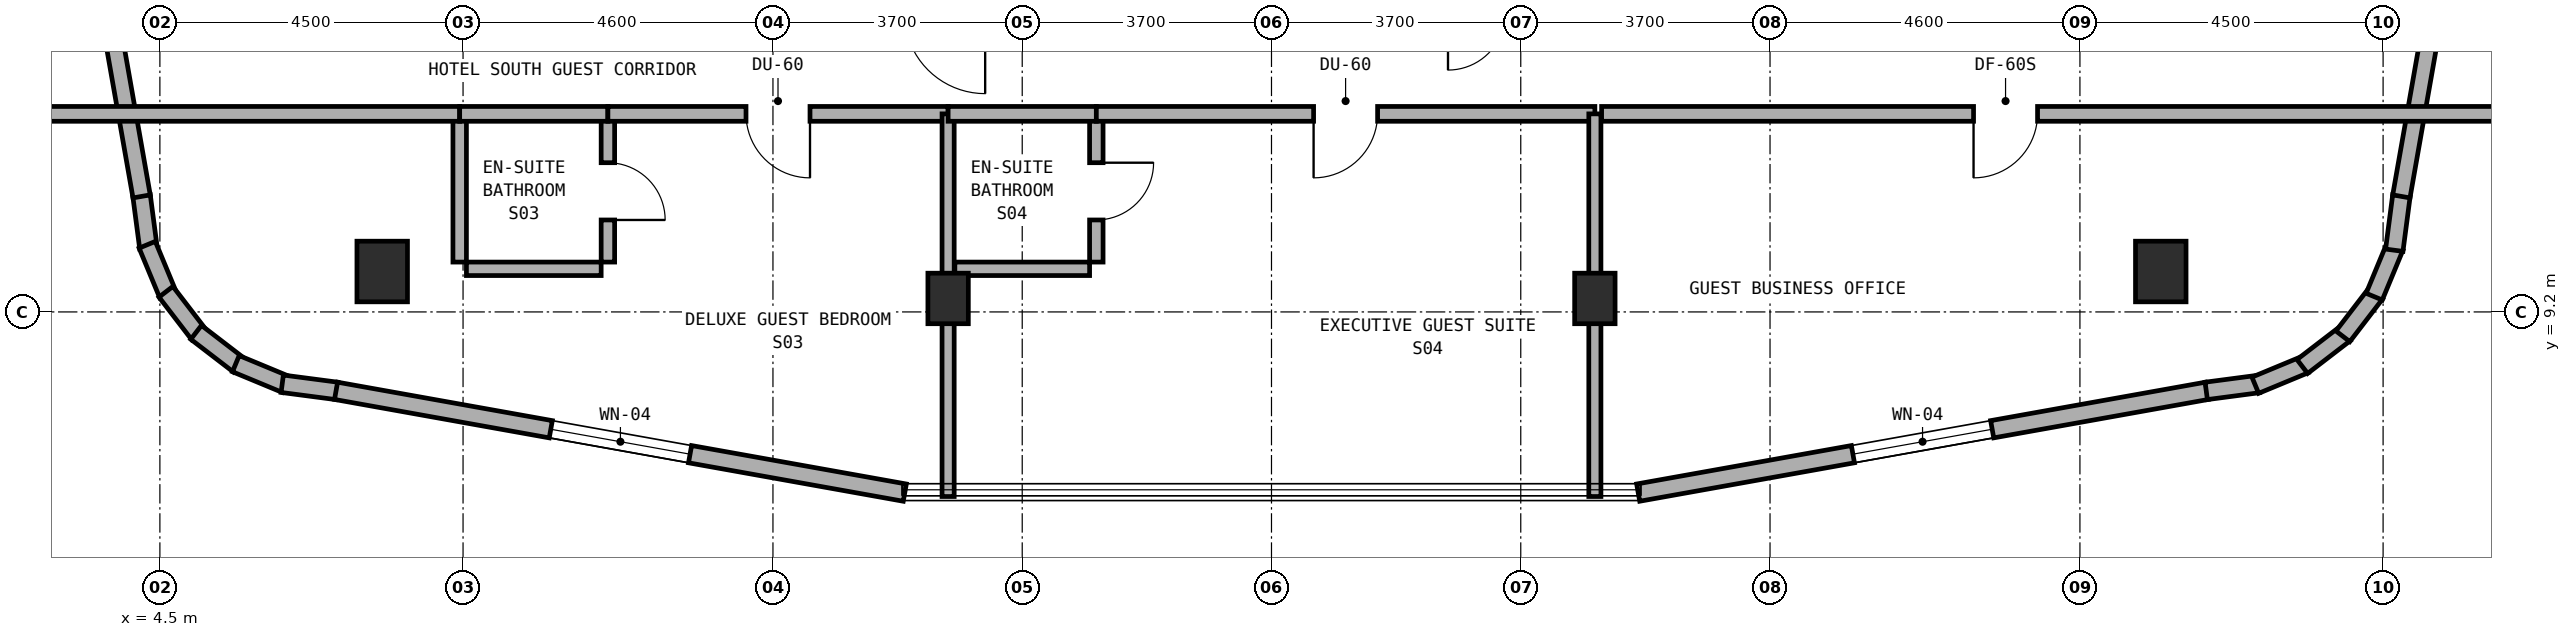
"""IFC4 building model, lengths in metres.
Left out: names, types, materials, properties, quantities, classifications, styles, units other than length and angle.
Written with IfcOpenShell. Run it as: python <this file> out.ifc"""

import sys

from ifc_helpers import new_model, si_unit, direction, frame, frame_2d, origin, origin_2d, place, context, subcontext, project, spatial, rectangle, extrude, element, fill, save


model = new_model("IFC4")
c1 = context("Model", 3, precision=1e-05, world=origin(), true_north=direction((0.0, 1.0)))
c2 = subcontext(c1, "Body", "Model", "MODEL_VIEW")
j1 = project(units=[si_unit("LENGTHUNIT", "METRE"), si_unit("PLANEANGLEUNIT", "RADIAN")], contexts=[c1])
p1 = place(None, origin())
s1 = spatial("IfcSite", under=j1, at=p1, CompositionType="ELEMENT")
p2 = place(p1, origin())
s2 = spatial("IfcBuilding", under=s1, at=p2, CompositionType="ELEMENT")
p3 = place(p2, frame((0.0, 0.0, 246.8)))
s3 = spatial("IfcBuildingStorey", under=s2, at=p3, CompositionType="ELEMENT", Elevation=246.8)
for number, where, z_axis, x_axis in (
    (1, (16.2, 9.4, 0.0), (0.0, 0.0, 1.0), (1.0, 0.0, 0.0)),
    (2, (25.8, 9.4, 0.0), (0.0, 0.0, 1.0), (1.0, 0.0, 0.0)),
):
    element("IfcColumn", number, at=place(p3, frame(where, z_axis=z_axis, x_axis=x_axis)), inside=s3, PredefinedType="COLUMN", context=c2, shape_type="SweptSolid", body=[
        extrude(rectangle(XDim=0.6, YDim=0.75, at=origin_2d()), origin(), (0.0, 0.0, 1.0), 3.6),
    ])
for number, where, z_axis, x_axis in (
    (3, (7.8, 9.8, 0.0), (0.0, 0.0, 1.0), (1.0, 0.0, 0.0)),
    (4, (34.2, 9.8, 0.0), (0.0, 0.0, 1.0), (1.0, 0.0, 0.0)),
):
    element("IfcColumn", number, at=place(p3, frame(where, z_axis=z_axis, x_axis=x_axis)), inside=s3, PredefinedType="COLUMN", context=c2, shape_type="SweptSolid", body=[
        extrude(rectangle(XDim=0.75, YDim=0.9, at=origin_2d()), origin(), (0.0, 0.0, 1.0), 3.6),
    ])
p4 = place(p3, frame((4.228, 10.925, 0.0), z_axis=(0.0, 0.0, 1.0), x_axis=(0.130689052056, -0.991423406861, 0.0)))
e5 = element("IfcWall", 5, at=p4, inside=s3, PredefinedType="STANDARD", context=c2, shape_type="SweptSolid", body=[
    extrude(rectangle(XDim=0.781, YDim=0.26, at=frame_2d((0.39, 0.0))), origin(), (0.0, 0.0, 1.0), 3.32),
])
p5 = place(p3, frame((4.312, 10.197, 0.0), z_axis=(0.0, 0.0, 1.0), x_axis=(0.382900540965, -0.923789573295, 0.0)))
e6 = element("IfcWall", 6, at=p5, inside=s3, PredefinedType="STANDARD", context=c2, shape_type="SweptSolid", body=[
    extrude(rectangle(XDim=0.799, YDim=0.26, at=frame_2d((0.399, 0.0))), origin(), (0.0, 0.0, 1.0), 3.32),
])
p6 = place(p3, frame((4.59, 9.499, 0.0), z_axis=(0.0, 0.0, 1.0), x_axis=(0.608823262828, -0.793305889705, 0.0)))
e7 = element("IfcWall", 7, at=p6, inside=s3, PredefinedType="STANDARD", context=c2, shape_type="SweptSolid", body=[
    extrude(rectangle(XDim=0.798, YDim=0.26, at=frame_2d((0.399, 0.0))), origin(), (0.0, 0.0, 1.0), 3.32),
])
p7 = place(p3, frame((5.038, 8.897, 0.0), z_axis=(0.0, 0.0, 1.0), x_axis=(0.793044635519, -0.60916352983, 0.0)))
e8 = element("IfcWall", 8, at=p7, inside=s3, PredefinedType="STANDARD", context=c2, shape_type="SweptSolid", body=[
    extrude(rectangle(XDim=0.798, YDim=0.26, at=frame_2d((0.399, 0.0))), origin(), (0.0, 0.0, 1.0), 3.32),
])
p8 = place(p3, frame((5.627, 8.432, 0.0), z_axis=(0.0, 0.0, 1.0), x_axis=(0.923789573295, -0.382900540965, 0.0)))
e9 = element("IfcWall", 9, at=p8, inside=s3, PredefinedType="STANDARD", context=c2, shape_type="SweptSolid", body=[
    extrude(rectangle(XDim=0.799, YDim=0.26, at=frame_2d((0.399, 0.0))), origin(), (0.0, 0.0, 1.0), 3.32),
])
p9 = place(p3, frame((6.316, 8.134, 0.0), z_axis=(0.0, 0.0, 1.0), x_axis=(0.99153354416, -0.129850802102, 0.0)))
e10 = element("IfcWall", 10, at=p9, inside=s3, PredefinedType="STANDARD", context=c2, shape_type="SweptSolid", body=[
    extrude(rectangle(XDim=0.816, YDim=0.26, at=frame_2d((0.408, 0.0))), origin(), (0.0, 0.0, 1.0), 3.32),
])
p10 = place(p3, frame((7.115, 8.029, 0.0), z_axis=(0.0, 0.0, 1.0), x_axis=(0.98435676639, -0.176186709098, 0.0)))
e11 = element("IfcWall", 11, at=p10, inside=s3, PredefinedType="STANDARD", context=c2, shape_type="SweptSolid", body=[
    extrude(rectangle(XDim=8.576, YDim=0.26, at=frame_2d((4.288, 0.0))), origin(), (0.0, 0.0, 1.0), 3.32),
])
p11 = place(p10, frame((3.238, 0.0, 0.85)))
e12 = element("IfcOpeningElement", 12, at=p11, cuts=e11, PredefinedType="OPENING", context=c2, shape_type="SweptSolid", body=[
    extrude(rectangle(XDim=2.1, YDim=1.5, at=frame_2d((1.05, 0.75))), frame((0.0, 0.14, 0.0), z_axis=(0.0, -1.0, 0.0), x_axis=(1.0, 0.0, 0.0)), (0.0, 0.0, 1.0), 0.28),
])
p12 = place(p3, frame((26.443, 6.518, 0.0), z_axis=(0.0, 0.0, 1.0), x_axis=(0.98435676639, 0.176186709098, 0.0)))
e13 = element("IfcWall", 13, at=p12, inside=s3, PredefinedType="STANDARD", context=c2, shape_type="SweptSolid", body=[
    extrude(rectangle(XDim=8.576, YDim=0.26, at=frame_2d((4.288, 0.0))), origin(), (0.0, 0.0, 1.0), 3.32),
])
p13 = place(p12, frame((3.238, 0.0, 0.85)))
e14 = element("IfcOpeningElement", 14, at=p13, cuts=e13, PredefinedType="OPENING", context=c2, shape_type="SweptSolid", body=[
    extrude(rectangle(XDim=2.1, YDim=1.5, at=frame_2d((1.05, 0.75))), frame((0.0, 0.14, 0.0), z_axis=(0.0, -1.0, 0.0), x_axis=(1.0, 0.0, 0.0)), (0.0, 0.0, 1.0), 0.28),
])
p14 = place(p3, frame((34.875, 8.028, 0.0), z_axis=(0.0, 0.0, 1.0), x_axis=(0.991458553189, 0.130422150372, 0.0)))
e15 = element("IfcWall", 15, at=p14, inside=s3, PredefinedType="STANDARD", context=c2, shape_type="SweptSolid", body=[
    extrude(rectangle(XDim=0.781, YDim=0.26, at=frame_2d((0.39, 0.0))), origin(), (0.0, 0.0, 1.0), 3.32),
])
p15 = place(p3, frame((35.603, 8.112, 0.0), z_axis=(0.0, 0.0, 1.0), x_axis=(0.923789573295, 0.382900540965, 0.0)))
e16 = element("IfcWall", 16, at=p15, inside=s3, PredefinedType="STANDARD", context=c2, shape_type="SweptSolid", body=[
    extrude(rectangle(XDim=0.799, YDim=0.26, at=frame_2d((0.399, 0.0))), origin(), (0.0, 0.0, 1.0), 3.32),
])
for number, where, z_axis, x_axis in (
    (17, (36.301, 8.39, 0.0), (0.0, 0.0, 1.0), (0.793, 0.609, 0.0)),
    (18, (36.903, 8.838, 0.0), (0.0, 0.0, 1.0), (0.609, 0.793, 0.0)),
):
    element("IfcWall", number, at=place(p3, frame(where, z_axis=z_axis, x_axis=x_axis)), inside=s3, PredefinedType="STANDARD", context=c2, shape_type="SweptSolid", body=[
        extrude(rectangle(XDim=0.798, YDim=0.26, at=frame_2d((0.399, 0.0))), origin(), (0.0, 0.0, 1.0), 3.32),
    ])
p16 = place(p3, frame((37.368, 9.427, 0.0), z_axis=(0.0, 0.0, 1.0), x_axis=(0.383161279238, 0.923681457047, 0.0)))
e19 = element("IfcWall", 19, at=p16, inside=s3, PredefinedType="STANDARD", context=c2, shape_type="SweptSolid", body=[
    extrude(rectangle(XDim=0.799, YDim=0.26, at=frame_2d((0.399, 0.0))), origin(), (0.0, 0.0, 1.0), 3.32),
])
p17 = place(p3, frame((37.666, 10.116, 0.0), z_axis=(0.0, 0.0, 1.0), x_axis=(0.129850802102, 0.99153354416, 0.0)))
e20 = element("IfcWall", 20, at=p17, inside=s3, PredefinedType="STANDARD", context=c2, shape_type="SweptSolid", body=[
    extrude(rectangle(XDim=0.816, YDim=0.26, at=frame_2d((0.408, 0.0))), origin(), (0.0, 0.0, 1.0), 3.32),
])
p18 = place(p3, frame((37.771, 10.915, 0.0), z_axis=(0.0, 0.0, 1.0), x_axis=(0.173396937698, 0.984852020355, 0.0)))
e21 = element("IfcWall", 21, at=p18, inside=s3, PredefinedType="STANDARD", context=c2, shape_type="SweptSolid", body=[
    extrude(rectangle(XDim=8.714, YDim=0.26, at=frame_2d((4.357, 0.0))), origin(), (0.0, 0.0, 1.0), 3.32),
])
p19 = place(p18, frame((4.647, 0.0, 0.85)))
e22 = element("IfcOpeningElement", 22, at=p19, cuts=e21, PredefinedType="OPENING", context=c2, shape_type="SweptSolid", body=[
    extrude(rectangle(XDim=2.1, YDim=1.5, at=frame_2d((1.05, 0.75))), frame((0.0, 0.14, 0.0), z_axis=(0.0, -1.0, 0.0), x_axis=(1.0, 0.0, 0.0)), (0.0, 0.0, 1.0), 0.28),
])
p20 = place(p3, frame((2.718, 19.497, 0.0), z_axis=(0.0, 0.0, 1.0), x_axis=(0.173396937698, -0.984852020355, 0.0)))
e23 = element("IfcWall", 23, at=p20, inside=s3, PredefinedType="STANDARD", context=c2, shape_type="SweptSolid", body=[
    extrude(rectangle(XDim=8.714, YDim=0.26, at=frame_2d((4.357, 0.0))), origin(), (0.0, 0.0, 1.0), 3.32),
])
p21 = place(p20, frame((2.627, 0.0, 0.85)))
e24 = element("IfcOpeningElement", 24, at=p21, cuts=e23, PredefinedType="OPENING", context=c2, shape_type="SweptSolid", body=[
    extrude(rectangle(XDim=2.1, YDim=1.5, at=frame_2d((1.05, 0.75))), frame((0.0, 0.14, 0.0), z_axis=(0.0, -1.0, 0.0), x_axis=(1.0, 0.0, 0.0)), (0.0, 0.0, 1.0), 0.28),
])
p22 = place(p3, frame((11.15, 9.94, 0.0), z_axis=(0.0, 0.0, 1.0), x_axis=(0.0, 1.0, 0.0)))
e25 = element("IfcWall", 25, at=p22, inside=s3, PredefinedType="PLUMBINGWALL", context=c2, shape_type="SweptSolid", body=[
    extrude(rectangle(XDim=2.1, YDim=0.2, at=frame_2d((1.05, 0.0))), origin(), (0.0, 0.0, 1.0), 3.025),
])
p23 = place(p22, frame((0.625, 0.0, 0.0)))
e26 = element("IfcOpeningElement", 26, at=p23, cuts=e25, PredefinedType="OPENING", context=c2, shape_type="SweptSolid", body=[
    extrude(rectangle(XDim=0.85, YDim=2.1, at=frame_2d((0.425, 1.05))), frame((0.0, 0.11, 0.0), z_axis=(0.0, -1.0, 0.0), x_axis=(1.0, 0.0, 0.0)), (0.0, 0.0, 1.0), 0.22),
])
p24 = place(p3, frame((9.05, 9.84, 0.0), z_axis=(0.0, 0.0, 1.0), x_axis=(1.0, 0.0, 0.0)))
e27 = element("IfcWall", 27, at=p24, inside=s3, PredefinedType="PLUMBINGWALL", context=c2, shape_type="SweptSolid", body=[
    extrude(rectangle(XDim=2.0, YDim=0.2, at=frame_2d((1.0, 0.0))), origin(), (0.0, 0.0, 1.0), 3.015),
])
p25 = place(p3, frame((8.95, 9.94, 0.0), z_axis=(0.0, 0.0, 1.0), x_axis=(0.0, 1.0, 0.0)))
e28 = element("IfcWall", 28, at=p25, inside=s3, PredefinedType="PLUMBINGWALL", context=c2, shape_type="SweptSolid", body=[
    extrude(rectangle(XDim=2.1, YDim=0.2, at=frame_2d((1.05, 0.0))), origin(), (0.0, 0.0, 1.0), 3.025),
])
p26 = place(p3, frame((2.76, 12.14, 0.0), z_axis=(0.0, 0.0, 1.0), x_axis=(1.0, 0.0, 0.0)))
e29 = element("IfcWall", 29, at=p26, inside=s3, PredefinedType="SOLIDWALL", context=c2, shape_type="SweptSolid", body=[
    extrude(rectangle(XDim=6.19, YDim=0.22, at=frame_2d((3.095, 0.0))), origin(), (0.0, 0.0, 1.0), 2.745),
])
p27 = place(p3, frame((8.95, 12.14, 0.0), z_axis=(0.0, 0.0, 1.0), x_axis=(1.0, 0.0, 0.0)))
e30 = element("IfcWall", 30, at=p27, inside=s3, PredefinedType="SOLIDWALL", context=c2, shape_type="SweptSolid", body=[
    extrude(rectangle(XDim=2.2, YDim=0.22, at=frame_2d((1.1, 0.0))), origin(), (0.0, 0.0, 1.0), 3.32),
])
p28 = place(p3, frame((11.15, 12.14, 0.0), z_axis=(0.0, 0.0, 1.0), x_axis=(1.0, 0.0, 0.0)))
e31 = element("IfcWall", 31, at=p28, inside=s3, PredefinedType="SOLIDWALL", context=c2, shape_type="SweptSolid", body=[
    extrude(rectangle(XDim=5.05, YDim=0.22, at=frame_2d((2.525, 0.0))), origin(), (0.0, 0.0, 1.0), 2.745),
])
p29 = place(p28, frame((2.05, 0.0, 0.0)))
e32 = element("IfcOpeningElement", 32, at=p29, cuts=e31, PredefinedType="OPENING", context=c2, shape_type="SweptSolid", body=[
    extrude(rectangle(XDim=0.95, YDim=2.1, at=frame_2d((0.475, 1.05))), frame((0.0, 0.12, 0.0), z_axis=(0.0, -1.0, 0.0), x_axis=(1.0, 0.0, 0.0)), (0.0, 0.0, 1.0), 0.24),
])
p30 = place(p3, frame((16.2, 6.46, 0.0), z_axis=(0.0, 0.0, 1.0), x_axis=(0.0, 1.0, 0.0)))
e33 = element("IfcWall", 33, at=p30, inside=s3, PredefinedType="SOLIDWALL", context=c2, shape_type="SweptSolid", body=[
    extrude(rectangle(XDim=5.68, YDim=0.18, at=frame_2d((2.84, 0.0))), origin(), (0.0, 0.0, 1.0), 2.745),
])
p31 = place(p3, frame((18.4, 9.94, 0.0), z_axis=(0.0, 0.0, 1.0), x_axis=(0.0, 1.0, 0.0)))
e34 = element("IfcWall", 34, at=p31, inside=s3, PredefinedType="PLUMBINGWALL", context=c2, shape_type="SweptSolid", body=[
    extrude(rectangle(XDim=2.1, YDim=0.2, at=frame_2d((1.05, 0.0))), origin(), (0.0, 0.0, 1.0), 3.025),
])
p32 = place(p31, frame((0.625, 0.0, 0.0)))
e35 = element("IfcOpeningElement", 35, at=p32, cuts=e34, PredefinedType="OPENING", context=c2, shape_type="SweptSolid", body=[
    extrude(rectangle(XDim=0.85, YDim=2.1, at=frame_2d((0.425, 1.05))), frame((0.0, 0.11, 0.0), z_axis=(0.0, -1.0, 0.0), x_axis=(1.0, 0.0, 0.0)), (0.0, 0.0, 1.0), 0.22),
])
p33 = place(p3, frame((16.3, 9.84, 0.0), z_axis=(0.0, 0.0, 1.0), x_axis=(1.0, 0.0, 0.0)))
e36 = element("IfcWall", 36, at=p33, inside=s3, PredefinedType="PLUMBINGWALL", context=c2, shape_type="SweptSolid", body=[
    extrude(rectangle(XDim=2.0, YDim=0.2, at=frame_2d((1.0, 0.0))), origin(), (0.0, 0.0, 1.0), 3.32),
])
p34 = place(p3, frame((16.2, 12.14, 0.0), z_axis=(0.0, 0.0, 1.0), x_axis=(1.0, 0.0, 0.0)))
e37 = element("IfcWall", 37, at=p34, inside=s3, PredefinedType="SOLIDWALL", context=c2, shape_type="SweptSolid", body=[
    extrude(rectangle(XDim=2.2, YDim=0.22, at=frame_2d((1.1, 0.0))), origin(), (0.0, 0.0, 1.0), 2.745),
])
p35 = place(p3, frame((18.4, 12.14, 0.0), z_axis=(0.0, 0.0, 1.0), x_axis=(1.0, 0.0, 0.0)))
e38 = element("IfcWall", 38, at=p35, inside=s3, PredefinedType="SOLIDWALL", context=c2, shape_type="SweptSolid", body=[
    extrude(rectangle(XDim=7.4, YDim=0.22, at=frame_2d((3.7, 0.0))), origin(), (0.0, 0.0, 1.0), 2.745),
])
p36 = place(p35, frame((3.225, 0.0, 0.0)))
e39 = element("IfcOpeningElement", 39, at=p36, cuts=e38, PredefinedType="OPENING", context=c2, shape_type="SweptSolid", body=[
    extrude(rectangle(XDim=0.95, YDim=2.1, at=frame_2d((0.475, 1.05))), frame((0.0, 0.12, 0.0), z_axis=(0.0, -1.0, 0.0), x_axis=(1.0, 0.0, 0.0)), (0.0, 0.0, 1.0), 0.24),
])
p37 = place(p3, frame((25.8, 6.46, 0.0), z_axis=(0.0, 0.0, 1.0), x_axis=(0.0, 1.0, 0.0)))
e40 = element("IfcWall", 40, at=p37, inside=s3, PredefinedType="SOLIDWALL", context=c2, shape_type="SweptSolid", body=[
    extrude(rectangle(XDim=5.68, YDim=0.18, at=frame_2d((2.84, 0.0))), origin(), (0.0, 0.0, 1.0), 2.745),
])
p38 = place(p3, frame((25.9, 12.14, 0.0), z_axis=(0.0, 0.0, 1.0), x_axis=(1.0, 0.0, 0.0)))
e41 = element("IfcWall", 41, at=p38, inside=s3, PredefinedType="SOLIDWALL", context=c2, shape_type="SweptSolid", body=[
    extrude(rectangle(XDim=13.24, YDim=0.22, at=frame_2d((6.62, 0.0))), origin(), (0.0, 0.0, 1.0), 2.745),
])
p39 = place(p38, frame((5.521, 0.0, 0.0)))
e42 = element("IfcOpeningElement", 42, at=p39, cuts=e41, PredefinedType="OPENING", context=c2, shape_type="SweptSolid", body=[
    extrude(rectangle(XDim=0.95, YDim=2.1, at=frame_2d((0.475, 1.05))), frame((0.0, 0.12, 0.0), z_axis=(0.0, -1.0, 0.0), x_axis=(1.0, 0.0, 0.0)), (0.0, 0.0, 1.0), 0.24),
])
p40 = place(p11, origin())
e43 = element("IfcWindow", 43, at=p40, inside=s3, PartitioningType="SINGLE_PANEL", PredefinedType="WINDOW", context=c2, shape_type="SweptSolid", body=[
    extrude(rectangle(XDim=2.1, YDim=1.5, at=frame_2d((1.05, 0.75))), frame((0.0, 0.03, 0.0), z_axis=(0.0, -1.0, 0.0), x_axis=(1.0, 0.0, 0.0)), (0.0, 0.0, 1.0), 0.06),
])
fill(e12, e43)
p41 = place(p13, origin())
e44 = element("IfcWindow", 44, at=p41, inside=s3, PartitioningType="SINGLE_PANEL", PredefinedType="WINDOW", context=c2, shape_type="SweptSolid", body=[
    extrude(rectangle(XDim=2.1, YDim=1.5, at=frame_2d((1.05, 0.75))), frame((0.0, 0.03, 0.0), z_axis=(0.0, -1.0, 0.0), x_axis=(1.0, 0.0, 0.0)), (0.0, 0.0, 1.0), 0.06),
])
fill(e14, e44)
p42 = place(p23, frame((0.85, 0.0, 0.0), z_axis=(0.0, 0.0, 1.0), x_axis=(-1.0, 0.0, 0.0)))
e45 = element("IfcDoor", 45, at=p42, inside=s3, OperationType="SINGLE_SWING_RIGHT", PredefinedType="DOOR", context=c2, shape_type="SweptSolid", body=[
    extrude(rectangle(XDim=0.85, YDim=2.1, at=frame_2d((0.425, 1.05))), frame((0.0, 0.025, 0.0), z_axis=(0.0, -1.0, 0.0), x_axis=(1.0, 0.0, 0.0)), (0.0, 0.0, 1.0), 0.05),
])
fill(e26, e45)
p43 = place(p29, frame((0.95, 0.0, 0.0), z_axis=(0.0, 0.0, 1.0), x_axis=(-1.0, 0.0, 0.0)))
e46 = element("IfcDoor", 46, at=p43, inside=s3, OperationType="SINGLE_SWING_LEFT", PredefinedType="DOOR", context=c2, shape_type="SweptSolid", body=[
    extrude(rectangle(XDim=0.95, YDim=2.1, at=frame_2d((0.475, 1.05))), frame((0.0, 0.025, 0.0), z_axis=(0.0, -1.0, 0.0), x_axis=(1.0, 0.0, 0.0)), (0.0, 0.0, 1.0), 0.05),
])
fill(e32, e46)
p44 = place(p32, frame((0.85, 0.0, 0.0), z_axis=(0.0, 0.0, 1.0), x_axis=(-1.0, 0.0, 0.0)))
e47 = element("IfcDoor", 47, at=p44, inside=s3, OperationType="SINGLE_SWING_LEFT", PredefinedType="DOOR", context=c2, shape_type="SweptSolid", body=[
    extrude(rectangle(XDim=0.85, YDim=2.1, at=frame_2d((0.425, 1.05))), frame((0.0, 0.025, 0.0), z_axis=(0.0, -1.0, 0.0), x_axis=(1.0, 0.0, 0.0)), (0.0, 0.0, 1.0), 0.05),
])
fill(e35, e47)
p45 = place(p36, frame((0.95, 0.0, 0.0), z_axis=(0.0, 0.0, 1.0), x_axis=(-1.0, 0.0, 0.0)))
e48 = element("IfcDoor", 48, at=p45, inside=s3, OperationType="SINGLE_SWING_RIGHT", PredefinedType="DOOR", context=c2, shape_type="SweptSolid", body=[
    extrude(rectangle(XDim=0.95, YDim=2.1, at=frame_2d((0.475, 1.05))), frame((0.0, 0.025, 0.0), z_axis=(0.0, -1.0, 0.0), x_axis=(1.0, 0.0, 0.0)), (0.0, 0.0, 1.0), 0.05),
])
fill(e39, e48)
p46 = place(p39, frame((0.95, 0.0, 0.0), z_axis=(0.0, 0.0, 1.0), x_axis=(-1.0, 0.0, 0.0)))
e49 = element("IfcDoor", 49, at=p46, inside=s3, OperationType="SINGLE_SWING_RIGHT", PredefinedType="DOOR", context=c2, shape_type="SweptSolid", body=[
    extrude(rectangle(XDim=0.95, YDim=2.1, at=frame_2d((0.475, 1.05))), frame((0.0, 0.025, 0.0), z_axis=(0.0, -1.0, 0.0), x_axis=(1.0, 0.0, 0.0)), (0.0, 0.0, 1.0), 0.05),
])
fill(e42, e49)
save(model, sys.argv[1])
